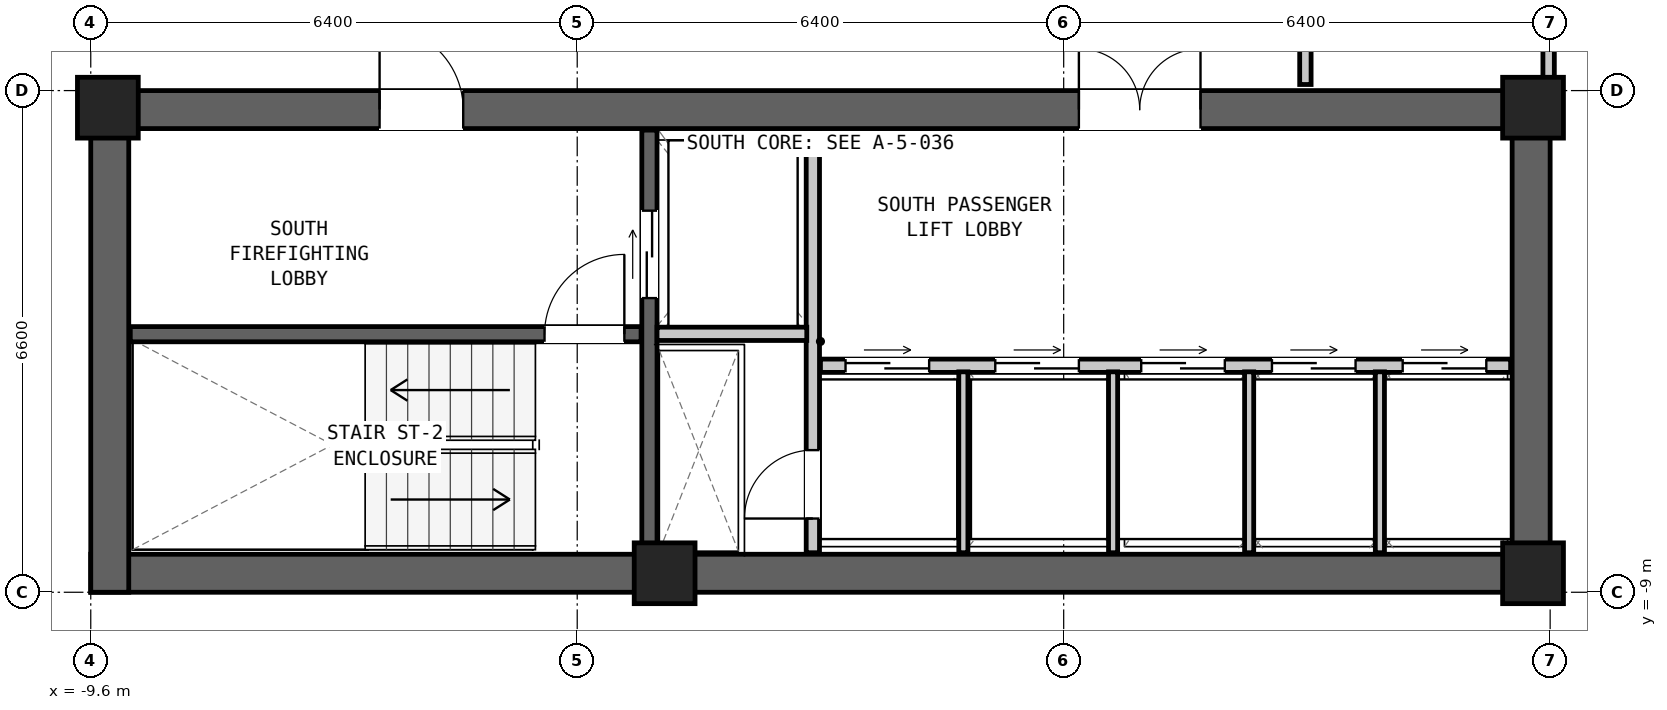
"""IFC4 building model, lengths in metres.
Left out: names, types, materials, properties, quantities, classifications, styles, units other than length and angle.
Written with IfcOpenShell. Run it as: python <this file> out.ifc"""

import sys

from ifc_helpers import new_model, si_unit, direction, frame, frame_2d, origin, origin_2d, place, context, subcontext, project, spatial, rectangle, extrude, element, fill, save


model = new_model("IFC4")
c1 = context("Model", 3, precision=1e-05, world=origin(), true_north=direction((0.0, 1.0)))
c2 = subcontext(c1, "Body", "Model", "MODEL_VIEW")
j1 = project(units=[si_unit("LENGTHUNIT", "METRE"), si_unit("PLANEANGLEUNIT", "RADIAN")], contexts=[c1])
p1 = place(None, origin())
s1 = spatial("IfcSite", under=j1, at=p1, CompositionType="ELEMENT")
p2 = place(p1, origin())
s2 = spatial("IfcBuilding", under=s1, at=p2, CompositionType="ELEMENT")
p3 = place(p2, frame((0.0, 0.0, 115.85)))
s3 = spatial("IfcBuildingStorey", under=s2, at=p3, CompositionType="ELEMENT", Elevation=115.85)
p4 = place(p3, frame((-9.6, -8.75, 0.0), z_axis=(0.0, 0.0, 1.0), x_axis=(1.0, 0.0, 0.0)))
e1 = element("IfcWall", 1, at=p4, inside=s3, PredefinedType="SHEAR", context=c2, shape_type="SweptSolid", body=[
    extrude(rectangle(XDim=19.2, YDim=0.5, at=frame_2d((9.6, 0.0))), origin(), (0.0, 0.0, 1.0), 3.05),
])
p5 = place(p3, frame((-9.6, -2.65, 0.0), z_axis=(0.0, 0.0, 1.0), x_axis=(1.0, 0.0, 0.0)))
e2 = element("IfcWall", 2, at=p5, inside=s3, PredefinedType="SHEAR", context=c2, shape_type="SweptSolid", body=[
    extrude(rectangle(XDim=19.2, YDim=0.5, at=frame_2d((9.6, 0.0))), origin(), (0.0, 0.0, 1.0), 3.05),
])
p6 = place(p5, frame((3.8, 0.0, 0.0)))
e3 = element("IfcOpeningElement", 3, at=p6, cuts=e2, PredefinedType="OPENING", context=c2, shape_type="SweptSolid", body=[
    extrude(rectangle(XDim=1.1, YDim=2.08, at=frame_2d((0.55, 1.04))), frame((0.0, 0.262, 0.0), z_axis=(0.0, -1.0, 0.0), x_axis=(1.0, 0.0, 0.0)), (0.0, 0.0, 1.0), 0.524),
])
p7 = place(p5, frame((13.0, 0.0, 0.0)))
e4 = element("IfcOpeningElement", 4, at=p7, cuts=e2, PredefinedType="OPENING", context=c2, shape_type="SweptSolid", body=[
    extrude(rectangle(XDim=1.6, YDim=2.12, at=frame_2d((0.8, 1.06))), frame((0.0, 0.262, 0.0), z_axis=(0.0, -1.0, 0.0), x_axis=(1.0, 0.0, 0.0)), (0.0, 0.0, 1.0), 0.524),
])
for number, where, z_axis, x_axis in (
    (5, (-9.35, -9.0, 0.0), (0.0, 0.0, 1.0), (0.0, 1.0, 0.0)),
    (6, (9.35, -9.0, 0.0), (0.0, 0.0, 1.0), (0.0, 1.0, 0.0)),
):
    element("IfcWall", number, at=place(p3, frame(where, z_axis=z_axis, x_axis=x_axis)), inside=s3, PredefinedType="SHEAR", context=c2, shape_type="SweptSolid", body=[
        extrude(rectangle(XDim=6.6, YDim=0.5, at=frame_2d((3.3, 0.0))), origin(), (0.0, 0.0, 1.0), 3.05),
    ])
for number, where, z_axis, x_axis in (
    (7, (-9.375, -2.625, 0.0), (0.0, 0.0, 1.0), (1.0, 0.0, 0.0)),
    (8, (9.375, -2.625, 0.0), (0.0, 0.0, 1.0), (1.0, 0.0, 0.0)),
    (9, (-2.05, -8.75, 0.0), (0.0, 0.0, 1.0), (1.0, 0.0, 0.0)),
    (10, (9.375, -8.75, 0.0), (0.0, 0.0, 1.0), (1.0, 0.0, 0.0)),
):
    element("IfcColumn", number, at=place(p3, frame(where, z_axis=z_axis, x_axis=x_axis)), inside=s3, PredefinedType="COLUMN", context=c2, shape_type="SweptSolid", body=[
        extrude(rectangle(XDim=0.8, YDim=0.8, at=origin_2d()), origin(), (0.0, 0.0, 1.0), 3.05),
    ])
p8 = place(p3, frame((-9.08, -5.605, 0.0), z_axis=(0.0, 0.0, 1.0), x_axis=(1.0, 0.0, 0.0)))
e11 = element("IfcWall", 11, at=p8, inside=s3, PredefinedType="SHEAR", context=c2, shape_type="SweptSolid", body=[
    extrude(rectangle(XDim=6.72, YDim=0.2, at=frame_2d((3.36, 0.0))), origin(), (0.0, 0.0, 1.0), 2.83),
])
p9 = place(p8, frame((5.45, 0.0, 0.0)))
e12 = element("IfcOpeningElement", 12, at=p9, cuts=e11, PredefinedType="OPENING", context=c2, shape_type="SweptSolid", body=[
    extrude(rectangle(XDim=1.05, YDim=2.08, at=frame_2d((0.525, 1.04))), frame((0.0, 0.112, 0.0), z_axis=(0.0, -1.0, 0.0), x_axis=(1.0, 0.0, 0.0)), (0.0, 0.0, 1.0), 0.224),
])
p10 = place(p3, frame((-2.25, -8.48, 0.0), z_axis=(0.0, 0.0, 1.0), x_axis=(0.0, 1.0, 0.0)))
e13 = element("IfcWall", 13, at=p10, inside=s3, PredefinedType="SHEAR", context=c2, shape_type="SweptSolid", body=[
    extrude(rectangle(XDim=5.56, YDim=0.2, at=frame_2d((2.78, 0.0))), origin(), (0.0, 0.0, 1.0), 2.83),
])
p11 = place(p10, frame((3.35, 0.0, 0.0)))
e14 = element("IfcOpeningElement", 14, at=p11, cuts=e13, PredefinedType="OPENING", context=c2, shape_type="SweptSolid", body=[
    extrude(rectangle(XDim=1.15, YDim=2.08, at=frame_2d((0.575, 1.04))), frame((0.0, 0.112, 0.0), z_axis=(0.0, -1.0, 0.0), x_axis=(1.0, 0.0, 0.0)), (0.0, 0.0, 1.0), 0.224),
])
p12 = place(p3, frame((-0.1, -8.48, 0.0), z_axis=(0.0, 0.0, 1.0), x_axis=(0.0, 1.0, 0.0)))
e15 = element("IfcWall", 15, at=p12, inside=s3, PredefinedType="PARTITIONING", context=c2, shape_type="SweptSolid", body=[
    extrude(rectangle(XDim=5.56, YDim=0.175, at=frame_2d((2.78, 0.0))), origin(), (0.0, 0.0, 1.0), 2.83),
])
p13 = place(p12, frame((0.45, 0.0, 0.0)))
e16 = element("IfcOpeningElement", 16, at=p13, cuts=e15, PredefinedType="OPENING", context=c2, shape_type="SweptSolid", body=[
    extrude(rectangle(XDim=0.9, YDim=2.05, at=frame_2d((0.45, 1.025))), frame((0.0, 0.1, 0.0), z_axis=(0.0, -1.0, 0.0), x_axis=(1.0, 0.0, 0.0)), (0.0, 0.0, 1.0), 0.199),
])
p14 = place(p3, frame((-2.15, -5.6, 0.0), z_axis=(0.0, 0.0, 1.0), x_axis=(1.0, 0.0, 0.0)))
e17 = element("IfcWall", 17, at=p14, inside=s3, PredefinedType="PARTITIONING", context=c2, shape_type="SweptSolid", body=[
    extrude(rectangle(XDim=1.97, YDim=0.175, at=frame_2d((0.985, 0.0))), origin(), (0.0, 0.0, 1.0), 2.83),
])
p15 = place(p3, frame((0.0, -6.02, 0.0), z_axis=(0.0, 0.0, 1.0), x_axis=(1.0, 0.0, 0.0)))
e18 = element("IfcWall", 18, at=p15, inside=s3, PredefinedType="PARTITIONING", context=c2, shape_type="SweptSolid", body=[
    extrude(rectangle(XDim=9.08, YDim=0.175, at=frame_2d((4.54, 0.0))), origin(), (0.0, 0.0, 1.0), 2.83),
])
p16 = place(p15, frame((0.33, 0.0, 0.0)))
e19 = element("IfcOpeningElement", 19, at=p16, cuts=e18, PredefinedType="OPENING", context=c2, shape_type="SweptSolid", body=[
    extrude(rectangle(XDim=1.1, YDim=2.06, at=frame_2d((0.55, 1.03))), frame((0.0, 0.1, 0.0), z_axis=(0.0, -1.0, 0.0), x_axis=(1.0, 0.0, 0.0)), (0.0, 0.0, 1.0), 0.199),
])
p17 = place(p15, frame((2.3, 0.0, 0.0)))
e20 = element("IfcOpeningElement", 20, at=p17, cuts=e18, PredefinedType="OPENING", context=c2, shape_type="SweptSolid", body=[
    extrude(rectangle(XDim=1.1, YDim=2.06, at=frame_2d((0.55, 1.03))), frame((0.0, 0.1, 0.0), z_axis=(0.0, -1.0, 0.0), x_axis=(1.0, 0.0, 0.0)), (0.0, 0.0, 1.0), 0.199),
])
p18 = place(p15, frame((4.22, 0.0, 0.0)))
e21 = element("IfcOpeningElement", 21, at=p18, cuts=e18, PredefinedType="OPENING", context=c2, shape_type="SweptSolid", body=[
    extrude(rectangle(XDim=1.1, YDim=2.06, at=frame_2d((0.55, 1.03))), frame((0.0, 0.1, 0.0), z_axis=(0.0, -1.0, 0.0), x_axis=(1.0, 0.0, 0.0)), (0.0, 0.0, 1.0), 0.199),
])
p19 = place(p15, frame((5.94, 0.0, 0.0)))
e22 = element("IfcOpeningElement", 22, at=p19, cuts=e18, PredefinedType="OPENING", context=c2, shape_type="SweptSolid", body=[
    extrude(rectangle(XDim=1.1, YDim=2.06, at=frame_2d((0.55, 1.03))), frame((0.0, 0.1, 0.0), z_axis=(0.0, -1.0, 0.0), x_axis=(1.0, 0.0, 0.0)), (0.0, 0.0, 1.0), 0.199),
])
p20 = place(p15, frame((7.66, 0.0, 0.0)))
e23 = element("IfcOpeningElement", 23, at=p20, cuts=e18, PredefinedType="OPENING", context=c2, shape_type="SweptSolid", body=[
    extrude(rectangle(XDim=1.1, YDim=2.06, at=frame_2d((0.55, 1.03))), frame((0.0, 0.1, 0.0), z_axis=(0.0, -1.0, 0.0), x_axis=(1.0, 0.0, 0.0)), (0.0, 0.0, 1.0), 0.199),
])
for number, where, z_axis, x_axis in (
    (24, (1.88, -8.48, 0.0), (0.0, 0.0, 1.0), (0.0, 1.0, 0.0)),
    (25, (3.85, -8.48, 0.0), (0.0, 0.0, 1.0), (0.0, 1.0, 0.0)),
    (26, (5.64, -8.48, 0.0), (0.0, 0.0, 1.0), (0.0, 1.0, 0.0)),
    (27, (7.36, -8.48, 0.0), (0.0, 0.0, 1.0), (0.0, 1.0, 0.0)),
):
    element("IfcWall", number, at=place(p3, frame(where, z_axis=z_axis, x_axis=x_axis)), inside=s3, PredefinedType="PARTITIONING", context=c2, shape_type="SweptSolid", body=[
        extrude(rectangle(XDim=2.38, YDim=0.12, at=frame_2d((1.19, 0.0))), origin(), (0.0, 0.0, 1.0), 2.83),
    ])
p21 = place(p3, frame((6.38, -2.32, 0.0), z_axis=(0.0, 0.0, 1.0), x_axis=(0.0, 1.0, 0.0)))
e28 = element("IfcWall", 28, at=p21, inside=s3, PredefinedType="PARTITIONING", context=c2, shape_type="SweptSolid", body=[
    extrude(rectangle(XDim=5.84, YDim=0.15, at=frame_2d((2.92, 0.0))), origin(), (0.0, 0.0, 1.0), 2.198),
])
p22 = place(p3, frame((9.58, -2.32, 0.0), z_axis=(0.0, 0.0, 1.0), x_axis=(0.0, 1.0, 0.0)))
e29 = element("IfcWall", 29, at=p22, inside=s3, PredefinedType="PARTITIONING", context=c2, shape_type="SweptSolid", body=[
    extrude(rectangle(XDim=5.84, YDim=0.15, at=frame_2d((2.92, 0.0))), origin(), (0.0, 0.0, 1.0), 2.198),
])
p23 = place(p22, frame((2.445, 0.0, 0.0)))
e30 = element("IfcOpeningElement", 30, at=p23, cuts=e29, PredefinedType="OPENING", context=c2, shape_type="SweptSolid", body=[
    extrude(rectangle(XDim=0.95, YDim=2.1, at=frame_2d((0.475, 1.05))), frame((0.0, 0.087, 0.0), z_axis=(0.0, -1.0, 0.0), x_axis=(1.0, 0.0, 0.0)), (0.0, 0.0, 1.0), 0.174),
])
p24 = place(p9, origin())
e31 = element("IfcDoor", 31, at=p24, inside=s3, OperationType="SINGLE_SWING_RIGHT", PredefinedType="DOOR", context=c2, shape_type="SweptSolid", body=[
    extrude(rectangle(XDim=1.05, YDim=2.08, at=frame_2d((0.525, 1.04))), frame((0.0, 0.025, 0.0), z_axis=(0.0, -1.0, 0.0), x_axis=(1.0, 0.0, 0.0)), (0.0, 0.0, 1.0), 0.05),
])
fill(e12, e31)
p25 = place(p6, origin())
e32 = element("IfcDoor", 32, at=p25, inside=s3, OperationType="SINGLE_SWING_LEFT", PredefinedType="DOOR", context=c2, shape_type="SweptSolid", body=[
    extrude(rectangle(XDim=1.1, YDim=2.08, at=frame_2d((0.55, 1.04))), frame((0.0, 0.025, 0.0), z_axis=(0.0, -1.0, 0.0), x_axis=(1.0, 0.0, 0.0)), (0.0, 0.0, 1.0), 0.05),
])
fill(e3, e32)
p26 = place(p11, origin())
e33 = element("IfcDoor", 33, at=p26, inside=s3, OperationType="DOUBLE_DOOR_SLIDING", PredefinedType="DOOR", context=c2, shape_type="SweptSolid", body=[
    extrude(rectangle(XDim=1.15, YDim=2.08, at=frame_2d((0.575, 1.04))), frame((0.0, 0.025, 0.0), z_axis=(0.0, -1.0, 0.0), x_axis=(1.0, 0.0, 0.0)), (0.0, 0.0, 1.0), 0.05),
])
fill(e14, e33)
p27 = place(p13, origin())
e34 = element("IfcDoor", 34, at=p27, inside=s3, OperationType="SINGLE_SWING_LEFT", PredefinedType="DOOR", context=c2, shape_type="SweptSolid", body=[
    extrude(rectangle(XDim=0.9, YDim=2.05, at=frame_2d((0.45, 1.025))), frame((0.0, 0.025, 0.0), z_axis=(0.0, -1.0, 0.0), x_axis=(1.0, 0.0, 0.0)), (0.0, 0.0, 1.0), 0.05),
])
fill(e16, e34)
p28 = place(p16, origin())
e35 = element("IfcDoor", 35, at=p28, inside=s3, OperationType="DOUBLE_DOOR_SLIDING", PredefinedType="DOOR", context=c2, shape_type="SweptSolid", body=[
    extrude(rectangle(XDim=1.1, YDim=2.06, at=frame_2d((0.55, 1.03))), frame((0.0, 0.025, 0.0), z_axis=(0.0, -1.0, 0.0), x_axis=(1.0, 0.0, 0.0)), (0.0, 0.0, 1.0), 0.05),
])
fill(e19, e35)
p29 = place(p17, origin())
e36 = element("IfcDoor", 36, at=p29, inside=s3, OperationType="DOUBLE_DOOR_SLIDING", PredefinedType="DOOR", context=c2, shape_type="SweptSolid", body=[
    extrude(rectangle(XDim=1.1, YDim=2.06, at=frame_2d((0.55, 1.03))), frame((0.0, 0.025, 0.0), z_axis=(0.0, -1.0, 0.0), x_axis=(1.0, 0.0, 0.0)), (0.0, 0.0, 1.0), 0.05),
])
fill(e20, e36)
p30 = place(p7, origin())
e37 = element("IfcDoor", 37, at=p30, inside=s3, OperationType="DOUBLE_DOOR_SINGLE_SWING", PredefinedType="DOOR", context=c2, shape_type="SweptSolid", body=[
    extrude(rectangle(XDim=1.6, YDim=2.12, at=frame_2d((0.8, 1.06))), frame((0.0, 0.025, 0.0), z_axis=(0.0, -1.0, 0.0), x_axis=(1.0, 0.0, 0.0)), (0.0, 0.0, 1.0), 0.05),
])
fill(e4, e37)
p31 = place(p18, origin())
e38 = element("IfcDoor", 38, at=p31, inside=s3, OperationType="DOUBLE_DOOR_SLIDING", PredefinedType="DOOR", context=c2, shape_type="SweptSolid", body=[
    extrude(rectangle(XDim=1.1, YDim=2.06, at=frame_2d((0.55, 1.03))), frame((0.0, 0.025, 0.0), z_axis=(0.0, -1.0, 0.0), x_axis=(1.0, 0.0, 0.0)), (0.0, 0.0, 1.0), 0.05),
])
fill(e21, e38)
p32 = place(p19, origin())
e39 = element("IfcDoor", 39, at=p32, inside=s3, OperationType="DOUBLE_DOOR_SLIDING", PredefinedType="DOOR", context=c2, shape_type="SweptSolid", body=[
    extrude(rectangle(XDim=1.1, YDim=2.06, at=frame_2d((0.55, 1.03))), frame((0.0, 0.025, 0.0), z_axis=(0.0, -1.0, 0.0), x_axis=(1.0, 0.0, 0.0)), (0.0, 0.0, 1.0), 0.05),
])
fill(e22, e39)
p33 = place(p20, origin())
e40 = element("IfcDoor", 40, at=p33, inside=s3, OperationType="DOUBLE_DOOR_SLIDING", PredefinedType="DOOR", context=c2, shape_type="SweptSolid", body=[
    extrude(rectangle(XDim=1.1, YDim=2.06, at=frame_2d((0.55, 1.03))), frame((0.0, 0.025, 0.0), z_axis=(0.0, -1.0, 0.0), x_axis=(1.0, 0.0, 0.0)), (0.0, 0.0, 1.0), 0.05),
])
fill(e23, e40)
save(model, sys.argv[1])
